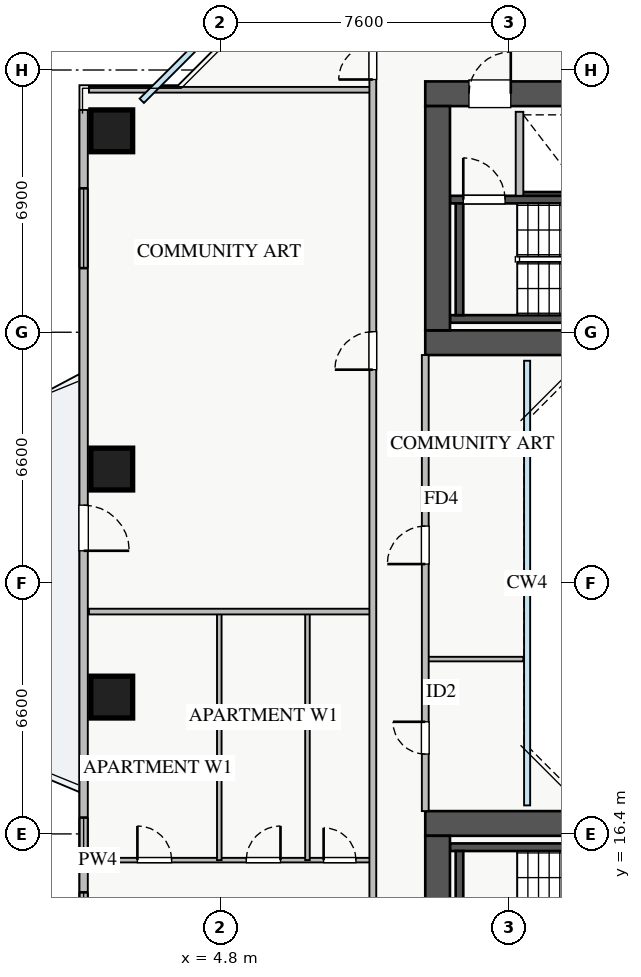
"""IFC4 building model, lengths in metres.
Left out: names, types, materials, properties, quantities, classifications, styles, units other than length and angle.
Written with IfcOpenShell. Run it as: python <this file> out.ifc"""

import sys

from ifc_helpers import new_model, si_unit, direction, frame, frame_2d, origin, origin_2d, place, context, subcontext, project, spatial, rectangle, extrude, source, transform, mapped, element, fill, save


model = new_model("IFC4")
c1 = context("Model", 3, precision=1e-05, world=origin(), true_north=direction((0.0, 1.0)))
c2 = subcontext(c1, "Body", "Model", "MODEL_VIEW")
j1 = project(units=[si_unit("LENGTHUNIT", "METRE"), si_unit("PLANEANGLEUNIT", "RADIAN")], contexts=[c1])
p1 = place(None, origin())
s1 = spatial("IfcSite", under=j1, at=p1, CompositionType="ELEMENT")
p2 = place(p1, origin())
s2 = spatial("IfcBuilding", under=s1, at=p2, CompositionType="ELEMENT")
p3 = place(p2, frame((0.0, 0.0, 97.0)))
s3 = spatial("IfcBuildingStorey", under=s2, at=p3, CompositionType="ELEMENT", Elevation=97.0)
p4 = place(p3, frame((12.68, 33.2, 0.0), z_axis=(0.0, 0.0, 1.0), x_axis=(1.0, 0.0, 0.0)))
e1 = element("IfcWall", 1, at=p4, inside=s3, PredefinedType="SHEAR", context=c2, shape_type="SweptSolid", body=[
    extrude(rectangle(XDim=1.94, YDim=0.18, at=frame_2d((0.97, 0.0))), origin(), (0.0, 0.0, 1.0), 3.07),
])
p5 = place(p3, frame((10.85, 29.95, 0.0), z_axis=(0.0, 0.0, 1.0), x_axis=(1.0, 0.0, 0.0)))
e2 = element("IfcWall", 2, at=p5, inside=s3, PredefinedType="SHEAR", context=c2, shape_type="SweptSolid", body=[
    extrude(rectangle(XDim=7.3, YDim=0.2, at=frame_2d((3.65, 0.0))), origin(), (0.0, 0.0, 1.0), 3.25),
])
p6 = place(p3, frame((10.85, 33.09, 0.0), z_axis=(0.0, 0.0, 1.0), x_axis=(1.0, 0.0, 0.0)))
e3 = element("IfcWall", 3, at=p6, inside=s3, PredefinedType="SHEAR", context=c2, shape_type="SweptSolid", body=[
    extrude(rectangle(XDim=7.3, YDim=0.2, at=frame_2d((3.65, 0.0))), origin(), (0.0, 0.0, 1.0), 3.25),
])
p7 = place(p6, frame((0.35, 0.0, 0.0)))
e4 = element("IfcOpeningElement", 4, at=p7, cuts=e3, PredefinedType="OPENING", context=c2, shape_type="SweptSolid", body=[
    extrude(rectangle(XDim=1.1, YDim=2.05, at=frame_2d((0.55, 1.025))), frame((0.0, 0.11, 0.0), z_axis=(0.0, -1.0, 0.0), x_axis=(1.0, 0.0, 0.0)), (0.0, 0.0, 1.0), 0.22),
])
p8 = place(p3, frame((11.1, 30.05, 0.0), z_axis=(0.0, 0.0, 1.0), x_axis=(0.0, 1.0, 0.0)))
e5 = element("IfcWall", 5, at=p8, inside=s3, PredefinedType="SHEAR", context=c2, shape_type="SweptSolid", body=[
    extrude(rectangle(XDim=2.94, YDim=0.2, at=frame_2d((1.47, 0.0))), origin(), (0.0, 0.0, 1.0), 3.25),
])
p9 = place(p3, frame((10.85, 16.05, 0.0), z_axis=(0.0, 0.0, 1.0), x_axis=(1.0, 0.0, 0.0)))
e6 = element("IfcWall", 6, at=p9, inside=s3, PredefinedType="SHEAR", context=c2, shape_type="SweptSolid", body=[
    extrude(rectangle(XDim=7.3, YDim=0.2, at=frame_2d((3.65, 0.0))), origin(), (0.0, 0.0, 1.0), 3.25),
])
p10 = place(p3, frame((11.1, 13.01, 0.0), z_axis=(0.0, 0.0, 1.0), x_axis=(0.0, 1.0, 0.0)))
e7 = element("IfcWall", 7, at=p10, inside=s3, PredefinedType="SHEAR", context=c2, shape_type="SweptSolid", body=[
    extrude(rectangle(XDim=2.94, YDim=0.2, at=frame_2d((1.47, 0.0))), origin(), (0.0, 0.0, 1.0), 3.25),
])
p11 = place(p3, frame((10.2, 29.325, 0.0), z_axis=(0.0, 0.0, 1.0), x_axis=(1.0, 0.0, 0.0)))
e8 = element("IfcWall", 8, at=p11, inside=s3, PredefinedType="SHEAR", context=c2, shape_type="SweptSolid", body=[
    extrude(rectangle(XDim=17.6, YDim=0.65, at=frame_2d((8.8, 0.0))), origin(), (0.0, 0.0, 1.0), 3.25),
])
p12 = place(p3, frame((10.2, 35.875, 0.0), z_axis=(0.0, 0.0, 1.0), x_axis=(1.0, 0.0, 0.0)))
e9 = element("IfcWall", 9, at=p12, inside=s3, PredefinedType="SHEAR", context=c2, shape_type="SweptSolid", body=[
    extrude(rectangle(XDim=17.6, YDim=0.65, at=frame_2d((8.8, 0.0))), origin(), (0.0, 0.0, 1.0), 3.25),
])
p13 = place(p12, frame((1.15, 0.0, 0.0)))
e10 = element("IfcOpeningElement", 10, at=p13, cuts=e9, PredefinedType="OPENING", context=c2, shape_type="SweptSolid", body=[
    extrude(rectangle(XDim=1.1, YDim=2.05, at=frame_2d((0.55, 1.025))), frame((0.0, 0.335, 0.0), z_axis=(0.0, -1.0, 0.0), x_axis=(1.0, 0.0, 0.0)), (0.0, 0.0, 1.0), 0.67),
])
p14 = place(p12, frame((8.3, 0.0, 0.0)))
e11 = element("IfcOpeningElement", 11, at=p14, cuts=e9, PredefinedType="OPENING", context=c2, shape_type="SweptSolid", body=[
    extrude(rectangle(XDim=1.1, YDim=2.05, at=frame_2d((0.55, 1.025))), frame((0.0, 0.335, 0.0), z_axis=(0.0, -1.0, 0.0), x_axis=(1.0, 0.0, 0.0)), (0.0, 0.0, 1.0), 0.67),
])
p15 = place(p12, frame((4.9, 0.0, 0.0)))
e12 = element("IfcOpeningElement", 12, at=p15, cuts=e9, PredefinedType="OPENING", context=c2, shape_type="SweptSolid", body=[
    extrude(rectangle(XDim=1.1, YDim=2.05, at=frame_2d((0.55, 1.025))), frame((0.0, 0.335, 0.0), z_axis=(0.0, -1.0, 0.0), x_axis=(1.0, 0.0, 0.0)), (0.0, 0.0, 1.0), 0.67),
])
p16 = place(p12, frame((14.74, 0.0, 0.0)))
e13 = element("IfcOpeningElement", 13, at=p16, cuts=e9, PredefinedType="OPENING", context=c2, shape_type="SweptSolid", body=[
    extrude(rectangle(XDim=1.0, YDim=2.05, at=frame_2d((0.5, 1.025))), frame((0.0, 0.335, 0.0), z_axis=(0.0, -1.0, 0.0), x_axis=(1.0, 0.0, 0.0)), (0.0, 0.0, 1.0), 0.67),
])
p17 = place(p12, frame((10.175, 0.0, 0.0)))
e14 = element("IfcOpeningElement", 14, at=p17, cuts=e9, PredefinedType="OPENING", context=c2, shape_type="SweptSolid", body=[
    extrude(rectangle(XDim=1.0, YDim=2.05, at=frame_2d((0.5, 1.025))), frame((0.0, 0.335, 0.0), z_axis=(0.0, -1.0, 0.0), x_axis=(1.0, 0.0, 0.0)), (0.0, 0.0, 1.0), 0.67),
])
p18 = place(p12, frame((12.625, 0.0, 0.0)))
e15 = element("IfcOpeningElement", 15, at=p18, cuts=e9, PredefinedType="OPENING", context=c2, shape_type="SweptSolid", body=[
    extrude(rectangle(XDim=1.0, YDim=2.05, at=frame_2d((0.5, 1.025))), frame((0.0, 0.335, 0.0), z_axis=(0.0, -1.0, 0.0), x_axis=(1.0, 0.0, 0.0)), (0.0, 0.0, 1.0), 0.67),
])
p19 = place(p3, frame((10.525, 29.65, 0.0), z_axis=(0.0, 0.0, 1.0), x_axis=(0.0, 1.0, 0.0)))
e16 = element("IfcWall", 16, at=p19, inside=s3, PredefinedType="SHEAR", context=c2, shape_type="SweptSolid", body=[
    extrude(rectangle(XDim=5.9, YDim=0.65, at=frame_2d((2.95, 0.0))), origin(), (0.0, 0.0, 1.0), 3.25),
])
p20 = place(p3, frame((10.2, 16.675, 0.0), z_axis=(0.0, 0.0, 1.0), x_axis=(1.0, 0.0, 0.0)))
e17 = element("IfcWall", 17, at=p20, inside=s3, PredefinedType="SHEAR", context=c2, shape_type="SweptSolid", body=[
    extrude(rectangle(XDim=17.6, YDim=0.65, at=frame_2d((8.8, 0.0))), origin(), (0.0, 0.0, 1.0), 3.25),
])
p21 = place(p3, frame((10.525, 10.45, 0.0), z_axis=(0.0, 0.0, 1.0), x_axis=(0.0, 1.0, 0.0)))
e18 = element("IfcWall", 18, at=p21, inside=s3, PredefinedType="SHEAR", context=c2, shape_type="SweptSolid", body=[
    extrude(rectangle(XDim=5.9, YDim=0.65, at=frame_2d((2.95, 0.0))), origin(), (0.0, 0.0, 1.0), 3.25),
])
m1 = source(origin(), c2, "Body", "SweptSolid", [
    extrude(rectangle(XDim=1.1, YDim=1.1, at=origin_2d()), origin(), (0.0, 0.0, 1.0), 3.25),
])
for number, where, z_axis, x_axis in (
    (19, (1.95, 34.9, 0.0), (0.0, 0.0, 1.0), (1.0, 0.0, 0.0)),
    (20, (1.95, 26.0, 0.0), (0.0, 0.0, 1.0), (1.0, 0.0, 0.0)),
    (21, (1.95, 20.0, 0.0), (0.0, 0.0, 1.0), (1.0, 0.0, 0.0)),
):
    element("IfcColumn", number, at=place(p3, frame(where, z_axis=z_axis, x_axis=x_axis)), inside=s3, PredefinedType="COLUMN", context=c2, shape_type="MappedRepresentation", body=[
        mapped(m1, transform((0.0, 0.0, 0.0), x_axis=(1.0, 0.0, 0.0), y_axis=(0.0, 1.0, 0.0), z_axis=(0.0, 0.0, 1.0), scale=1.0)),
    ])
p22 = place(p3, frame((1.21, 10.55, 0.0), z_axis=(0.0, 0.0, 1.0), x_axis=(0.0, 1.0, 0.0)))
e22 = element("IfcWall", 22, at=p22, inside=s3, PredefinedType="STANDARD", context=c2, shape_type="SweptSolid", body=[
    extrude(rectangle(XDim=24.9, YDim=0.22, at=frame_2d((12.45, 0.0))), origin(), (0.0, 0.0, 1.0), 2.61),
])
p23 = place(p22, frame((13.3, 0.0, 0.0)))
e23 = element("IfcOpeningElement", 23, at=p23, cuts=e22, PredefinedType="OPENING", context=c2, shape_type="SweptSolid", body=[
    extrude(rectangle(XDim=1.2, YDim=2.1, at=frame_2d((0.6, 1.05))), frame((0.0, 0.12, 0.0), z_axis=(0.0, -1.0, 0.0), x_axis=(1.0, 0.0, 0.0)), (0.0, 0.0, 1.0), 0.24),
])
p24 = place(p22, frame((1.912, 0.0, 0.9)))
e24 = element("IfcOpeningElement", 24, at=p24, cuts=e22, PredefinedType="OPENING", context=c2, shape_type="SweptSolid", body=[
    extrude(rectangle(XDim=2.4, YDim=1.48, at=frame_2d((1.2, 0.74))), frame((0.0, 0.12, 0.0), z_axis=(0.0, -1.0, 0.0), x_axis=(1.0, 0.0, 0.0)), (0.0, 0.0, 1.0), 0.24),
])
p25 = place(p22, frame((20.737, 0.0, 0.9)))
e25 = element("IfcOpeningElement", 25, at=p25, cuts=e22, PredefinedType="OPENING", context=c2, shape_type="SweptSolid", body=[
    extrude(rectangle(XDim=2.1, YDim=1.48, at=frame_2d((1.05, 0.74))), frame((0.0, 0.12, 0.0), z_axis=(0.0, -1.0, 0.0), x_axis=(1.0, 0.0, 0.0)), (0.0, 0.0, 1.0), 0.24),
])
p26 = place(p22, frame((5.38, 0.0, 0.9)))
e26 = element("IfcOpeningElement", 26, at=p26, cuts=e22, PredefinedType="OPENING", context=c2, shape_type="SweptSolid", body=[
    extrude(rectangle(XDim=0.9, YDim=1.2, at=frame_2d((0.45, 0.6))), frame((0.0, 0.12, 0.0), z_axis=(0.0, -1.0, 0.0), x_axis=(1.0, 0.0, 0.0)), (0.0, 0.0, 1.0), 0.24),
])
p27 = place(p3, frame((12.68, 33.19, 0.0), z_axis=(0.0, 0.0, 1.0), x_axis=(0.0, 1.0, 0.0)))
e27 = element("IfcWall", 27, at=p27, inside=s3, PredefinedType="PARTITIONING", context=c2, shape_type="SweptSolid", body=[
    extrude(rectangle(XDim=2.21, YDim=0.2, at=frame_2d((1.105, 0.0))), origin(), (0.0, 0.0, 1.0), 3.07),
])
p28 = place(p3, frame((1.35, 35.98, 0.0), z_axis=(0.0, 0.0, 1.0), x_axis=(1.0, 0.0, 0.0)))
e28 = element("IfcWall", 28, at=p28, inside=s3, PredefinedType="PARTITIONING", context=c2, shape_type="SweptSolid", body=[
    extrude(rectangle(XDim=7.47, YDim=0.15, at=frame_2d((3.735, 0.0))), origin(), (0.0, 0.0, 1.0), 3.07),
])
p29 = place(p3, frame((1.35, 15.71, 0.0), z_axis=(0.0, 0.0, 1.0), x_axis=(1.0, 0.0, 0.0)))
e29 = element("IfcWall", 29, at=p29, inside=s3, PredefinedType="PLUMBINGWALL", context=c2, shape_type="SweptSolid", body=[
    extrude(rectangle(XDim=7.47, YDim=0.12, at=frame_2d((3.735, 0.0))), origin(), (0.0, 0.0, 1.0), 3.07),
])
p30 = place(p29, frame((1.275, 0.0, 0.0)))
e30 = element("IfcOpeningElement", 30, at=p30, cuts=e29, PredefinedType="OPENING", context=c2, shape_type="SweptSolid", body=[
    extrude(rectangle(XDim=0.9, YDim=2.05, at=frame_2d((0.45, 1.025))), frame((0.0, 0.07, 0.0), z_axis=(0.0, -1.0, 0.0), x_axis=(1.0, 0.0, 0.0)), (0.0, 0.0, 1.0), 0.14),
])
p31 = place(p29, frame((4.14, 0.0, 0.0)))
e31 = element("IfcOpeningElement", 31, at=p31, cuts=e29, PredefinedType="OPENING", context=c2, shape_type="SweptSolid", body=[
    extrude(rectangle(XDim=0.9, YDim=2.05, at=frame_2d((0.45, 1.025))), frame((0.0, 0.07, 0.0), z_axis=(0.0, -1.0, 0.0), x_axis=(1.0, 0.0, 0.0)), (0.0, 0.0, 1.0), 0.14),
])
p32 = place(p29, frame((6.175, 0.0, 0.0)))
e32 = element("IfcOpeningElement", 32, at=p32, cuts=e29, PredefinedType="OPENING", context=c2, shape_type="SweptSolid", body=[
    extrude(rectangle(XDim=0.85, YDim=2.05, at=frame_2d((0.425, 1.025))), frame((0.0, 0.07, 0.0), z_axis=(0.0, -1.0, 0.0), x_axis=(1.0, 0.0, 0.0)), (0.0, 0.0, 1.0), 0.14),
])
for number, where, z_axis, x_axis in (
    (33, (4.78, 15.71, 0.0), (0.0, 0.0, 1.0), (0.0, 1.0, 0.0)),
    (34, (7.1, 15.71, 0.0), (0.0, 0.0, 1.0), (0.0, 1.0, 0.0)),
):
    element("IfcWall", number, at=place(p3, frame(where, z_axis=z_axis, x_axis=x_axis)), inside=s3, PredefinedType="PLUMBINGWALL", context=c2, shape_type="SweptSolid", body=[
        extrude(rectangle(XDim=6.54, YDim=0.12, at=frame_2d((3.27, 0.0))), origin(), (0.0, 0.0, 1.0), 3.07),
    ])
p33 = place(p3, frame((1.35, 22.25, 0.0), z_axis=(0.0, 0.0, 1.0), x_axis=(1.0, 0.0, 0.0)))
e35 = element("IfcWall", 35, at=p33, inside=s3, PredefinedType="PARTITIONING", context=c2, shape_type="SweptSolid", body=[
    extrude(rectangle(XDim=7.47, YDim=0.15, at=frame_2d((3.735, 0.0))), origin(), (0.0, 0.0, 1.0), 3.07),
])
p34 = place(p3, frame((8.82, 8.31, 0.0), z_axis=(0.0, 0.0, 1.0), x_axis=(0.0, 1.0, 0.0)))
e36 = element("IfcWall", 36, at=p34, inside=s3, PredefinedType="PARTITIONING", context=c2, shape_type="SweptSolid", body=[
    extrude(rectangle(XDim=29.13, YDim=0.18, at=frame_2d((14.565, 0.0))), origin(), (0.0, 0.0, 1.0), 3.07),
])
p35 = place(p34, frame((27.94, 0.0, 0.0)))
e37 = element("IfcOpeningElement", 37, at=p35, cuts=e36, PredefinedType="OPENING", context=c2, shape_type="SweptSolid", body=[
    extrude(rectangle(XDim=0.9, YDim=2.05, at=frame_2d((0.45, 1.025))), frame((0.0, 0.1, 0.0), z_axis=(0.0, -1.0, 0.0), x_axis=(1.0, 0.0, 0.0)), (0.0, 0.0, 1.0), 0.2),
])
p36 = place(p34, frame((0.24, 0.0, 0.0)))
e38 = element("IfcOpeningElement", 38, at=p36, cuts=e36, PredefinedType="OPENING", context=c2, shape_type="SweptSolid", body=[
    extrude(rectangle(XDim=0.9, YDim=2.05, at=frame_2d((0.45, 1.025))), frame((0.0, 0.1, 0.0), z_axis=(0.0, -1.0, 0.0), x_axis=(1.0, 0.0, 0.0)), (0.0, 0.0, 1.0), 0.2),
])
p37 = place(p34, frame((3.69, 0.0, 0.0)))
e39 = element("IfcOpeningElement", 39, at=p37, cuts=e36, PredefinedType="OPENING", context=c2, shape_type="SweptSolid", body=[
    extrude(rectangle(XDim=1.0, YDim=2.05, at=frame_2d((0.5, 1.025))), frame((0.0, 0.1, 0.0), z_axis=(0.0, -1.0, 0.0), x_axis=(1.0, 0.0, 0.0)), (0.0, 0.0, 1.0), 0.2),
])
p38 = place(p34, frame((20.305, 0.0, 0.0)))
e40 = element("IfcOpeningElement", 40, at=p38, cuts=e36, PredefinedType="OPENING", context=c2, shape_type="SweptSolid", body=[
    extrude(rectangle(XDim=1.0, YDim=2.05, at=frame_2d((0.5, 1.025))), frame((0.0, 0.1, 0.0), z_axis=(0.0, -1.0, 0.0), x_axis=(1.0, 0.0, 0.0)), (0.0, 0.0, 1.0), 0.2),
])
p39 = place(p3, frame((10.2, 21.0, 0.0), z_axis=(0.0, 0.0, 1.0), x_axis=(1.0, 0.0, 0.0)))
e41 = element("IfcWall", 41, at=p39, inside=s3, PredefinedType="PLUMBINGWALL", context=c2, shape_type="SweptSolid", body=[
    extrude(rectangle(XDim=2.58, YDim=0.12, at=frame_2d((1.29, 0.0))), origin(), (0.0, 0.0, 1.0), 3.07),
])
p40 = place(p3, frame((10.2, 17.0, 0.0), z_axis=(0.0, 0.0, 1.0), x_axis=(0.0, 1.0, 0.0)))
e42 = element("IfcWall", 42, at=p40, inside=s3, PredefinedType="PARTITIONING", context=c2, shape_type="SweptSolid", body=[
    extrude(rectangle(XDim=12.0, YDim=0.18, at=frame_2d((6.0, 0.0))), origin(), (0.0, 0.0, 1.0), 3.07),
])
p41 = place(p40, frame((1.5, 0.0, 0.0)))
e43 = element("IfcOpeningElement", 43, at=p41, cuts=e42, PredefinedType="OPENING", context=c2, shape_type="SweptSolid", body=[
    extrude(rectangle(XDim=0.85, YDim=2.05, at=frame_2d((0.425, 1.025))), frame((0.0, 0.1, 0.0), z_axis=(0.0, -1.0, 0.0), x_axis=(1.0, 0.0, 0.0)), (0.0, 0.0, 1.0), 0.2),
])
p42 = place(p40, frame((6.5, 0.0, 0.0)))
e44 = element("IfcOpeningElement", 44, at=p42, cuts=e42, PredefinedType="OPENING", context=c2, shape_type="SweptSolid", body=[
    extrude(rectangle(XDim=1.0, YDim=2.05, at=frame_2d((0.5, 1.025))), frame((0.0, 0.1, 0.0), z_axis=(0.0, -1.0, 0.0), x_axis=(1.0, 0.0, 0.0)), (0.0, 0.0, 1.0), 0.2),
])
m2 = source(origin(), c2, "Body", "SweptSolid", [
    extrude(rectangle(XDim=1.2, YDim=2.1, at=frame_2d((0.6, 1.05))), frame((0.0, 0.025, 0.0), z_axis=(0.0, -1.0, 0.0), x_axis=(1.0, 0.0, 0.0)), (0.0, 0.0, 1.0), 0.05),
])
p43 = place(p23, frame((1.2, 0.0, 0.0), z_axis=(0.0, 0.0, 1.0), x_axis=(-1.0, 0.0, 0.0)))
e45 = element("IfcDoor", 45, at=p43, inside=s3, OperationType="SINGLE_SWING_LEFT", PredefinedType="DOOR", context=c2, shape_type="MappedRepresentation", body=[
    mapped(m2, transform((0.0, 0.0, 0.0), x_axis=(1.0, 0.0, 0.0), y_axis=(0.0, 1.0, 0.0), z_axis=(0.0, 0.0, 1.0), scale=1.0)),
])
fill(e23, e45)
m3 = source(origin(), c2, "Body", "SweptSolid", [
    extrude(rectangle(XDim=2.4, YDim=1.48, at=frame_2d((1.2, 0.74))), frame((0.0, 0.03, 0.0), z_axis=(0.0, -1.0, 0.0), x_axis=(1.0, 0.0, 0.0)), (0.0, 0.0, 1.0), 0.06),
])
p44 = place(p24, origin())
e46 = element("IfcWindow", 46, at=p44, inside=s3, PartitioningType="TRIPLE_PANEL_VERTICAL", PredefinedType="WINDOW", context=c2, shape_type="MappedRepresentation", body=[
    mapped(m3, transform((0.0, 0.0, 0.0), x_axis=(1.0, 0.0, 0.0), y_axis=(0.0, 1.0, 0.0), z_axis=(0.0, 0.0, 1.0), scale=1.0)),
])
fill(e24, e46)
m4 = source(origin(), c2, "Body", "SweptSolid", [
    extrude(rectangle(XDim=2.1, YDim=1.48, at=frame_2d((1.05, 0.74))), frame((0.0, 0.03, 0.0), z_axis=(0.0, -1.0, 0.0), x_axis=(1.0, 0.0, 0.0)), (0.0, 0.0, 1.0), 0.06),
])
p45 = place(p25, origin())
e47 = element("IfcWindow", 47, at=p45, inside=s3, PartitioningType="TRIPLE_PANEL_VERTICAL", PredefinedType="WINDOW", context=c2, shape_type="MappedRepresentation", body=[
    mapped(m4, transform((0.0, 0.0, 0.0), x_axis=(1.0, 0.0, 0.0), y_axis=(0.0, 1.0, 0.0), z_axis=(0.0, 0.0, 1.0), scale=1.0)),
])
fill(e25, e47)
m5 = source(origin(), c2, "Body", "SweptSolid", [
    extrude(rectangle(XDim=1.1, YDim=2.05, at=frame_2d((0.55, 1.025))), frame((0.0, 0.025, 0.0), z_axis=(0.0, -1.0, 0.0), x_axis=(1.0, 0.0, 0.0)), (0.0, 0.0, 1.0), 0.05),
])
p46 = place(p13, origin())
e48 = element("IfcDoor", 48, at=p46, inside=s3, OperationType="SINGLE_SWING_RIGHT", PredefinedType="DOOR", context=c2, shape_type="MappedRepresentation", body=[
    mapped(m5, transform((0.0, 0.0, 0.0), x_axis=(1.0, 0.0, 0.0), y_axis=(0.0, 1.0, 0.0), z_axis=(0.0, 0.0, 1.0), scale=1.0)),
])
fill(e10, e48)
p47 = place(p7, origin())
e49 = element("IfcDoor", 49, at=p47, inside=s3, OperationType="SINGLE_SWING_LEFT", PredefinedType="DOOR", context=c2, shape_type="MappedRepresentation", body=[
    mapped(m5, transform((0.0, 0.0, 0.0), x_axis=(1.0, 0.0, 0.0), y_axis=(0.0, 1.0, 0.0), z_axis=(0.0, 0.0, 1.0), scale=1.0)),
])
fill(e4, e49)
m6 = source(origin(), c2, "Body", "SweptSolid", [
    extrude(rectangle(XDim=0.9, YDim=2.05, at=frame_2d((0.45, 1.025))), frame((0.0, 0.025, 0.0), z_axis=(0.0, -1.0, 0.0), x_axis=(1.0, 0.0, 0.0)), (0.0, 0.0, 1.0), 0.05),
])
p48 = place(p30, origin())
e50 = element("IfcDoor", 50, at=p48, inside=s3, OperationType="SINGLE_SWING_LEFT", PredefinedType="DOOR", context=c2, shape_type="MappedRepresentation", body=[
    mapped(m6, transform((0.0, 0.0, 0.0), x_axis=(1.0, 0.0, 0.0), y_axis=(0.0, 1.0, 0.0), z_axis=(0.0, 0.0, 1.0), scale=1.0)),
])
fill(e30, e50)
p49 = place(p31, origin())
e51 = element("IfcDoor", 51, at=p49, inside=s3, OperationType="SINGLE_SWING_RIGHT", PredefinedType="DOOR", context=c2, shape_type="MappedRepresentation", body=[
    mapped(m6, transform((0.0, 0.0, 0.0), x_axis=(1.0, 0.0, 0.0), y_axis=(0.0, 1.0, 0.0), z_axis=(0.0, 0.0, 1.0), scale=1.0)),
])
fill(e31, e51)
m7 = source(origin(), c2, "Body", "SweptSolid", [
    extrude(rectangle(XDim=0.85, YDim=2.05, at=frame_2d((0.425, 1.025))), frame((0.0, 0.025, 0.0), z_axis=(0.0, -1.0, 0.0), x_axis=(1.0, 0.0, 0.0)), (0.0, 0.0, 1.0), 0.05),
])
p50 = place(p32, origin())
e52 = element("IfcDoor", 52, at=p50, inside=s3, OperationType="SINGLE_SWING_LEFT", PredefinedType="DOOR", context=c2, shape_type="MappedRepresentation", body=[
    mapped(m7, transform((0.0, 0.0, 0.0), x_axis=(1.0, 0.0, 0.0), y_axis=(0.0, 1.0, 0.0), z_axis=(0.0, 0.0, 1.0), scale=1.0)),
])
fill(e32, e52)
p51 = place(p35, origin())
e53 = element("IfcDoor", 53, at=p51, inside=s3, OperationType="SINGLE_SWING_LEFT", PredefinedType="DOOR", context=c2, shape_type="MappedRepresentation", body=[
    mapped(m6, transform((0.0, 0.0, 0.0), x_axis=(1.0, 0.0, 0.0), y_axis=(0.0, 1.0, 0.0), z_axis=(0.0, 0.0, 1.0), scale=1.0)),
])
fill(e37, e53)
m8 = source(origin(), c2, "Body", "SweptSolid", [
    extrude(rectangle(XDim=1.0, YDim=2.05, at=frame_2d((0.5, 1.025))), frame((0.0, 0.025, 0.0), z_axis=(0.0, -1.0, 0.0), x_axis=(1.0, 0.0, 0.0)), (0.0, 0.0, 1.0), 0.05),
])
p52 = place(p38, origin())
e54 = element("IfcDoor", 54, at=p52, inside=s3, OperationType="SINGLE_SWING_LEFT", PredefinedType="DOOR", context=c2, shape_type="MappedRepresentation", body=[
    mapped(m8, transform((0.0, 0.0, 0.0), x_axis=(1.0, 0.0, 0.0), y_axis=(0.0, 1.0, 0.0), z_axis=(0.0, 0.0, 1.0), scale=1.0)),
])
fill(e40, e54)
p53 = place(p41, origin())
e55 = element("IfcDoor", 55, at=p53, inside=s3, OperationType="SINGLE_SWING_RIGHT", PredefinedType="DOOR", context=c2, shape_type="MappedRepresentation", body=[
    mapped(m7, transform((0.0, 0.0, 0.0), x_axis=(1.0, 0.0, 0.0), y_axis=(0.0, 1.0, 0.0), z_axis=(0.0, 0.0, 1.0), scale=1.0)),
])
fill(e43, e55)
p54 = place(p42, origin())
e56 = element("IfcDoor", 56, at=p54, inside=s3, OperationType="SINGLE_SWING_LEFT", PredefinedType="DOOR", context=c2, shape_type="MappedRepresentation", body=[
    mapped(m8, transform((0.0, 0.0, 0.0), x_axis=(1.0, 0.0, 0.0), y_axis=(0.0, 1.0, 0.0), z_axis=(0.0, 0.0, 1.0), scale=1.0)),
])
fill(e44, e56)
m9 = source(origin(), c2, "Body", "SweptSolid", [
    extrude(rectangle(XDim=0.9, YDim=1.2, at=frame_2d((0.45, 0.6))), frame((0.0, 0.03, 0.0), z_axis=(0.0, -1.0, 0.0), x_axis=(1.0, 0.0, 0.0)), (0.0, 0.0, 1.0), 0.06),
])
p55 = place(p26, origin())
e57 = element("IfcWindow", 57, at=p55, inside=s3, PartitioningType="SINGLE_PANEL", PredefinedType="WINDOW", context=c2, shape_type="MappedRepresentation", body=[
    mapped(m9, transform((0.0, 0.0, 0.0), x_axis=(1.0, 0.0, 0.0), y_axis=(0.0, 1.0, 0.0), z_axis=(0.0, 0.0, 1.0), scale=1.0)),
])
fill(e26, e57)
save(model, sys.argv[1])
